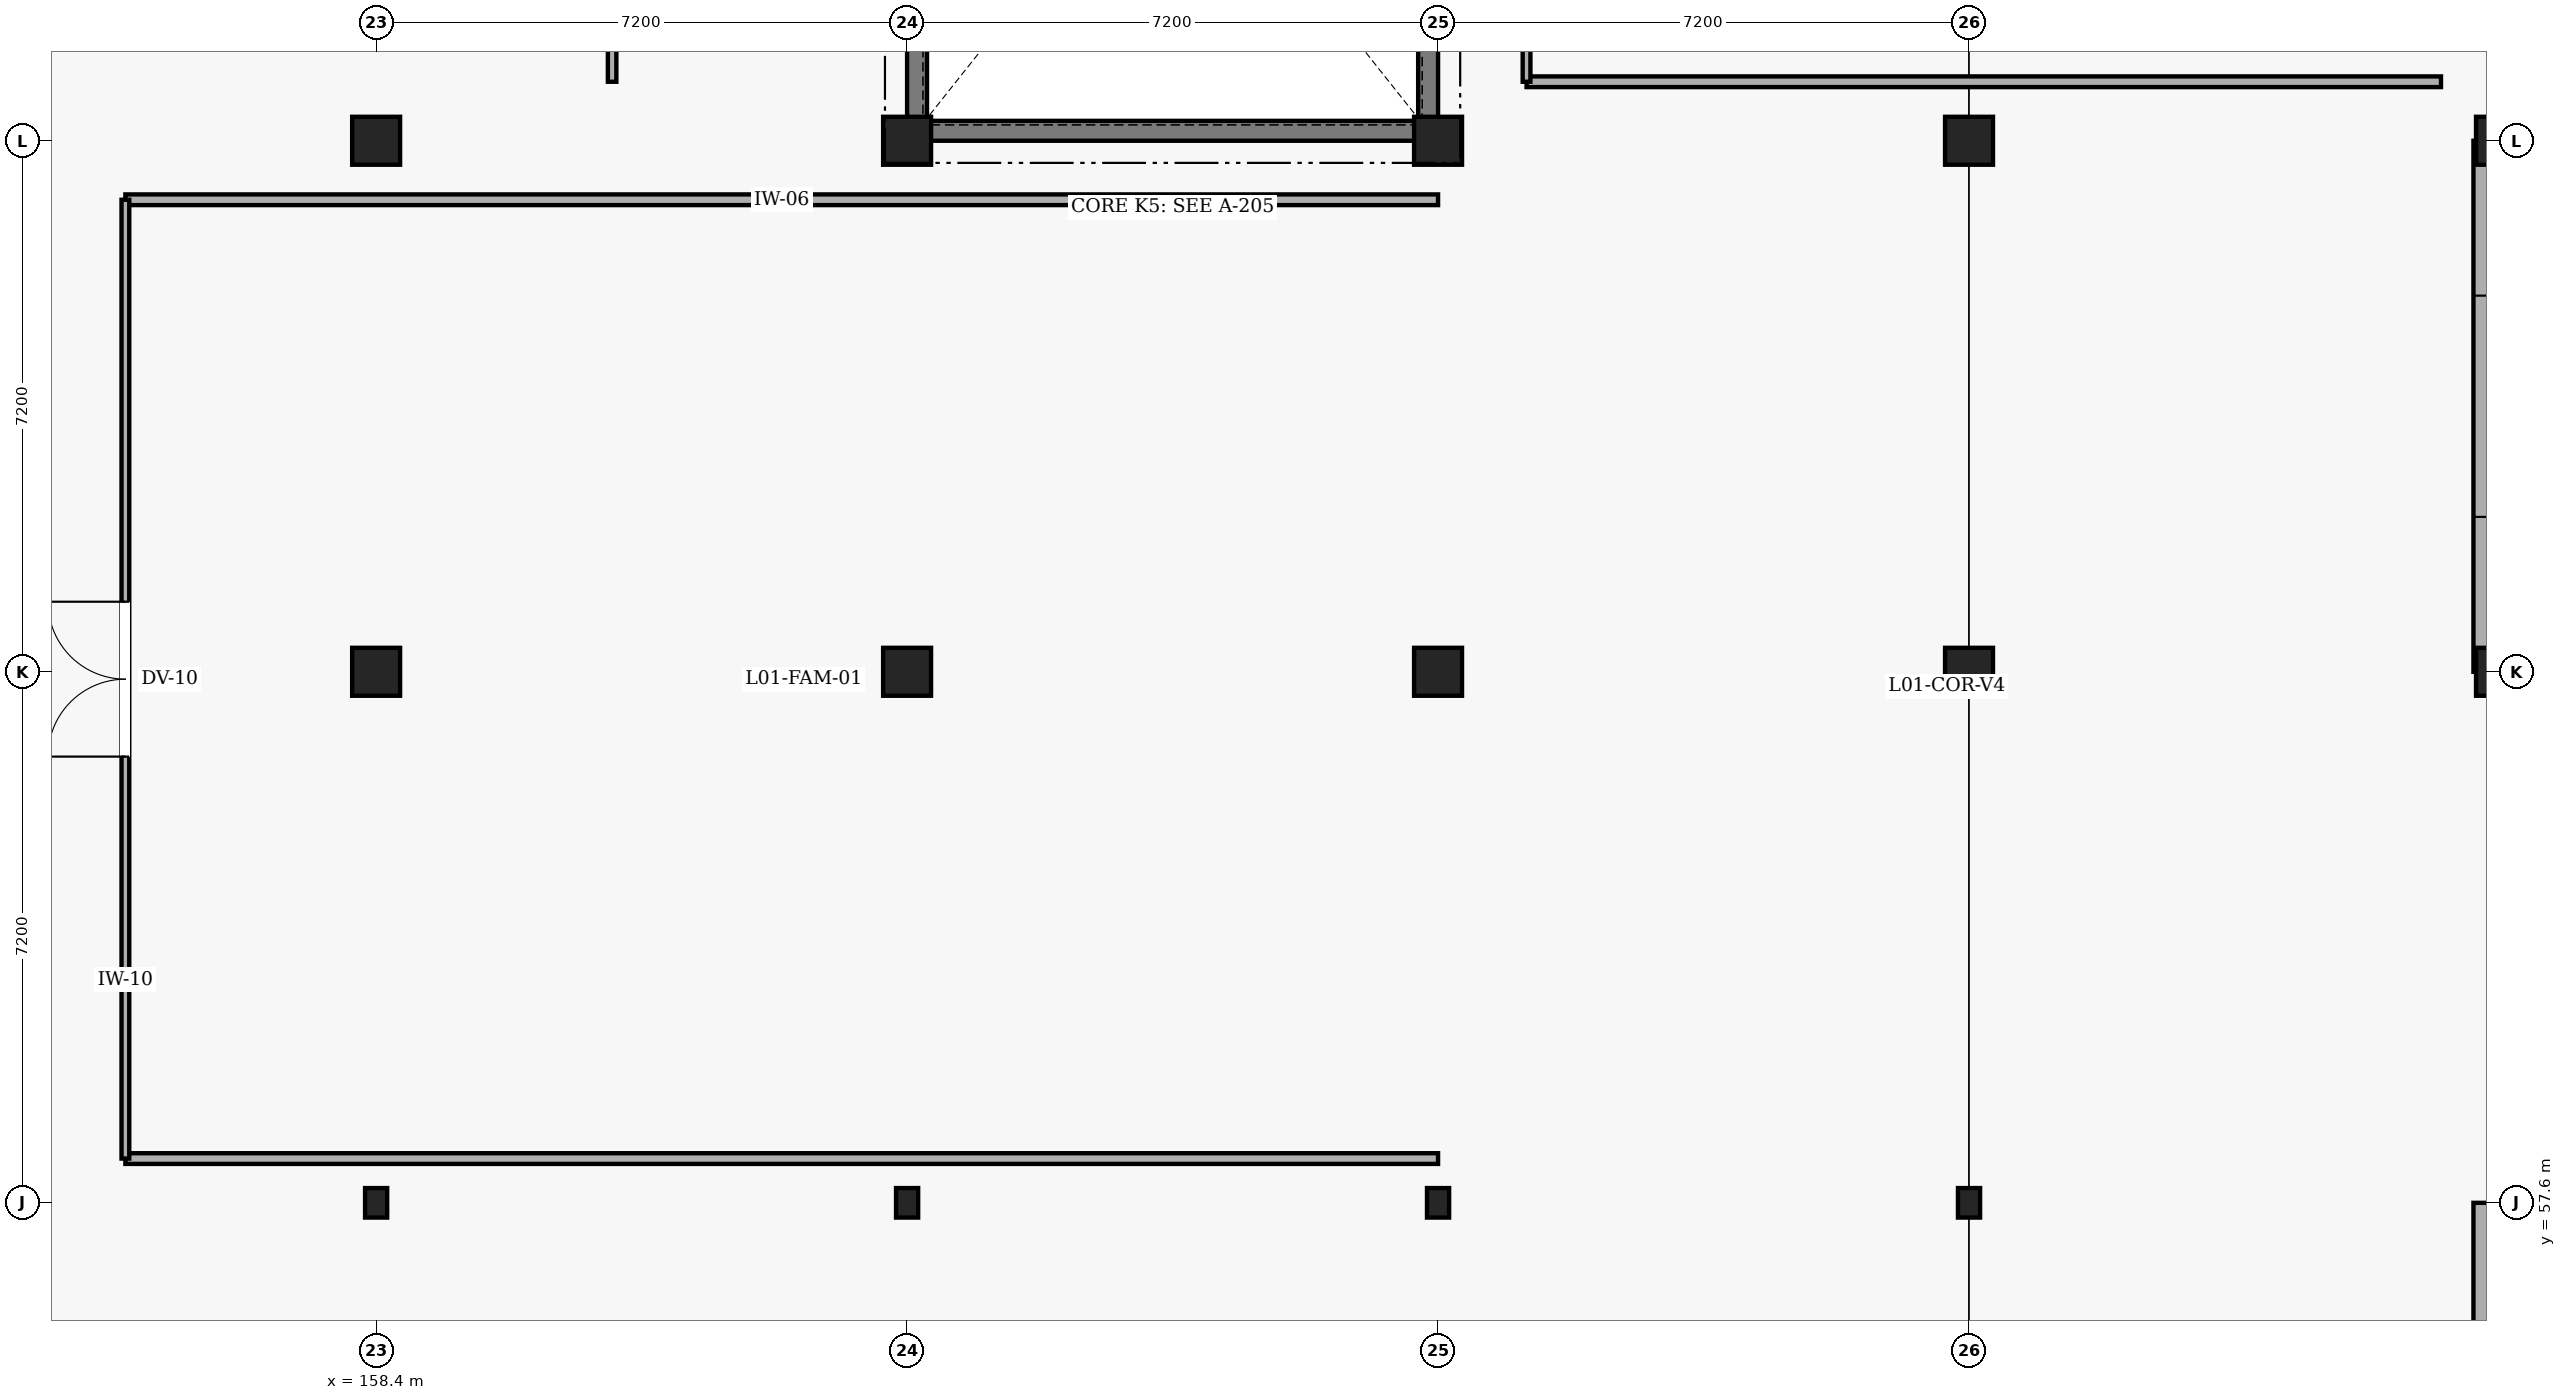
"""IFC4 building model, lengths in metres.
Left out: names, types, materials, properties, quantities, classifications, styles, units other than length and angle.
Written with IfcOpenShell. Run it as: python <this file> out.ifc"""

import sys

from ifc_helpers import new_model, si_unit, direction, frame, frame_2d, origin, origin_2d, place, context, subcontext, project, spatial, rectangle, i_section, extrude, element, fill, save


model = new_model("IFC4")
c1 = context("Model", 3, precision=1e-05, world=origin(), true_north=direction((0.0, 1.0)))
c2 = subcontext(c1, "Body", "Model", "MODEL_VIEW")
j1 = project(units=[si_unit("LENGTHUNIT", "METRE"), si_unit("PLANEANGLEUNIT", "RADIAN")], contexts=[c1])
p1 = place(None, origin())
s1 = spatial("IfcSite", under=j1, at=p1, CompositionType="ELEMENT")
p2 = place(p1, origin())
s2 = spatial("IfcBuilding", under=s1, at=p2, CompositionType="ELEMENT")
p3 = place(p2, frame((0.0, 0.0, 5.4)))
s3 = spatial("IfcBuildingStorey", under=s2, at=p3, CompositionType="ELEMENT", Elevation=5.4)
p4 = place(p3, frame((172.665, 86.13, 0.0), z_axis=(0.0, 0.0, 1.0), x_axis=(0.0, -1.0, 0.0)))
e1 = element("IfcWall", 1, at=p4, inside=s3, PredefinedType="SHEAR", context=c2, shape_type="SweptSolid", body=[
    extrude(rectangle(XDim=13.86, YDim=0.27, at=frame_2d((6.93, 0.0))), origin(), (0.0, 0.0, 1.0), 4.2),
])
p5 = place(p3, frame((172.8, 72.135, 0.0), z_axis=(0.0, 0.0, 1.0), x_axis=(-1.0, 0.0, 0.0)))
e2 = element("IfcWall", 2, at=p5, inside=s3, PredefinedType="SHEAR", context=c2, shape_type="SweptSolid", body=[
    extrude(rectangle(XDim=7.2, YDim=0.27, at=frame_2d((3.6, 0.0))), origin(), (0.0, 0.0, 1.0), 4.2),
])
p6 = place(p3, frame((165.735, 72.27, 0.0), z_axis=(0.0, 0.0, 1.0), x_axis=(0.0, 1.0, 0.0)))
e3 = element("IfcWall", 3, at=p6, inside=s3, PredefinedType="SHEAR", context=c2, shape_type="SweptSolid", body=[
    extrude(rectangle(XDim=13.86, YDim=0.27, at=frame_2d((6.93, 0.0))), origin(), (0.0, 0.0, 1.0), 4.2),
])
p7 = place(p6, frame((9.8, 0.0, 0.0)))
e4 = element("IfcOpeningElement", 4, at=p7, cuts=e3, PredefinedType="OPENING", context=c2, shape_type="SweptSolid", body=[
    extrude(rectangle(XDim=1.25, YDim=2.2, at=frame_2d((0.625, 1.1))), frame((0.0, 0.145, 0.0), z_axis=(0.0, -1.0, 0.0), x_axis=(1.0, 0.0, 0.0)), (0.0, 0.0, 1.0), 0.29),
])
p8 = place(p3, frame((158.4, 57.6, 0.0), z_axis=(0.0, 0.0, 1.0), x_axis=(1.0, 0.0, 0.0)))
e5 = element("IfcColumn", 5, at=p8, inside=s3, PredefinedType="COLUMN", context=c2, shape_type="SweptSolid", body=[
    extrude(i_section(OverallWidth=0.3, OverallDepth=0.4, WebThickness=0.013, FlangeThickness=0.024, FilletRadius=0.027, at=origin_2d()), origin(), (0.0, 0.0, 1.0), 3.9),
])
for number, where, z_axis, x_axis in (
    (6, (158.4, 64.8, 0.0), (0.0, 0.0, 1.0), (1.0, 0.0, 0.0)),
    (7, (158.4, 72.0, 0.0), (0.0, 0.0, 1.0), (1.0, 0.0, 0.0)),
):
    element("IfcColumn", number, at=place(p3, frame(where, z_axis=z_axis, x_axis=x_axis)), inside=s3, PredefinedType="COLUMN", context=c2, shape_type="SweptSolid", body=[
        extrude(rectangle(XDim=0.65, YDim=0.65, at=origin_2d()), origin(), (0.0, 0.0, 1.0), 3.9),
    ])
p9 = place(p3, frame((165.6, 57.6, 0.0), z_axis=(0.0, 0.0, 1.0), x_axis=(1.0, 0.0, 0.0)))
e8 = element("IfcColumn", 8, at=p9, inside=s3, PredefinedType="COLUMN", context=c2, shape_type="SweptSolid", body=[
    extrude(i_section(OverallWidth=0.3, OverallDepth=0.4, WebThickness=0.013, FlangeThickness=0.024, FilletRadius=0.027, at=origin_2d()), origin(), (0.0, 0.0, 1.0), 3.9),
])
for number, where, z_axis, x_axis in (
    (9, (165.6, 64.8, 0.0), (0.0, 0.0, 1.0), (1.0, 0.0, 0.0)),
    (10, (165.6, 72.0, 0.0), (0.0, 0.0, 1.0), (1.0, 0.0, 0.0)),
):
    element("IfcColumn", number, at=place(p3, frame(where, z_axis=z_axis, x_axis=x_axis)), inside=s3, PredefinedType="COLUMN", context=c2, shape_type="SweptSolid", body=[
        extrude(rectangle(XDim=0.65, YDim=0.65, at=origin_2d()), origin(), (0.0, 0.0, 1.0), 3.9),
    ])
p10 = place(p3, frame((172.8, 57.6, 0.0), z_axis=(0.0, 0.0, 1.0), x_axis=(1.0, 0.0, 0.0)))
e11 = element("IfcColumn", 11, at=p10, inside=s3, PredefinedType="COLUMN", context=c2, shape_type="SweptSolid", body=[
    extrude(i_section(OverallWidth=0.3, OverallDepth=0.4, WebThickness=0.013, FlangeThickness=0.024, FilletRadius=0.027, at=origin_2d()), origin(), (0.0, 0.0, 1.0), 3.9),
])
for number, where, z_axis, x_axis in (
    (12, (172.8, 64.8, 0.0), (0.0, 0.0, 1.0), (1.0, 0.0, 0.0)),
    (13, (172.8, 72.0, 0.0), (0.0, 0.0, 1.0), (1.0, 0.0, 0.0)),
):
    element("IfcColumn", number, at=place(p3, frame(where, z_axis=z_axis, x_axis=x_axis)), inside=s3, PredefinedType="COLUMN", context=c2, shape_type="SweptSolid", body=[
        extrude(rectangle(XDim=0.65, YDim=0.65, at=origin_2d()), origin(), (0.0, 0.0, 1.0), 3.9),
    ])
p11 = place(p3, frame((180.0, 57.6, 0.0), z_axis=(0.0, 0.0, 1.0), x_axis=(1.0, 0.0, 0.0)))
e14 = element("IfcColumn", 14, at=p11, inside=s3, PredefinedType="COLUMN", context=c2, shape_type="SweptSolid", body=[
    extrude(i_section(OverallWidth=0.3, OverallDepth=0.4, WebThickness=0.013, FlangeThickness=0.024, FilletRadius=0.027, at=origin_2d()), origin(), (0.0, 0.0, 1.0), 3.9),
])
for number, where, z_axis, x_axis in (
    (15, (180.0, 64.8, 0.0), (0.0, 0.0, 1.0), (1.0, 0.0, 0.0)),
    (16, (180.0, 72.0, 0.0), (0.0, 0.0, 1.0), (1.0, 0.0, 0.0)),
):
    element("IfcColumn", number, at=place(p3, frame(where, z_axis=z_axis, x_axis=x_axis)), inside=s3, PredefinedType="COLUMN", context=c2, shape_type="SweptSolid", body=[
        extrude(rectangle(XDim=0.65, YDim=0.65, at=origin_2d()), origin(), (0.0, 0.0, 1.0), 3.9),
    ])
for number, where, z_axis, x_axis in (
    (17, (187.2, 64.8, 0.0), (0.0, 0.0, 1.0), (1.0, 0.0, 0.0)),
    (18, (187.2, 72.0, 0.0), (0.0, 0.0, 1.0), (1.0, 0.0, 0.0)),
):
    element("IfcColumn", number, at=place(p3, frame(where, z_axis=z_axis, x_axis=x_axis)), inside=s3, PredefinedType="COLUMN", context=c2, shape_type="SweptSolid", body=[
        extrude(rectangle(XDim=0.65, YDim=0.65, at=origin_2d()), origin(), (0.0, 0.0, 1.0), 3.95),
    ])
p12 = place(p3, frame((187.02, 72.0, 0.0), z_axis=(0.0, 0.0, 1.0), x_axis=(0.0, -1.0, 0.0)))
e19 = element("IfcWall", 19, at=p12, inside=s3, PredefinedType="SOLIDWALL", context=c2, shape_type="SweptSolid", body=[
    extrude(rectangle(XDim=7.2, YDim=0.36, at=frame_2d((3.6, 0.0))), origin(), (0.0, 0.0, 1.0), 3.62),
])
p13 = place(p12, frame((2.1, 0.0, 0.9)))
e20 = element("IfcOpeningElement", 20, at=p13, cuts=e19, PredefinedType="OPENING", context=c2, shape_type="SweptSolid", body=[
    extrude(rectangle(XDim=3.0, YDim=1.75, at=frame_2d((1.5, 0.875))), frame((0.0, 0.19, 0.0), z_axis=(0.0, -1.0, 0.0), x_axis=(1.0, 0.0, 0.0)), (0.0, 0.0, 1.0), 0.38),
])
p14 = place(p3, frame((187.02, 57.6, 0.0), z_axis=(0.0, 0.0, 1.0), x_axis=(0.0, -1.0, 0.0)))
e21 = element("IfcWall", 21, at=p14, inside=s3, PredefinedType="SOLIDWALL", context=c2, shape_type="SweptSolid", body=[
    extrude(rectangle(XDim=7.23, YDim=0.36, at=frame_2d((3.615, 0.0))), origin(), (0.0, 0.0, 1.0), 3.25),
])
p15 = place(p14, frame((2.05, 0.0, 0.9)))
e22 = element("IfcOpeningElement", 22, at=p15, cuts=e21, PredefinedType="OPENING", context=c2, shape_type="SweptSolid", body=[
    extrude(rectangle(XDim=3.1, YDim=1.8, at=frame_2d((1.55, 0.9))), frame((0.0, 0.19, 0.0), z_axis=(0.0, -1.0, 0.0), x_axis=(1.0, 0.0, 0.0)), (0.0, 0.0, 1.0), 0.38),
])
for number, where, z_axis, x_axis in (
    (23, (155.0, 71.2, 0.0), (0.0, 0.0, 1.0), (1.0, 0.0, 0.0)),
    (24, (172.8, 58.2, 0.0), (0.0, 0.0, 1.0), (-1.0, 0.0, 0.0)),
):
    element("IfcWall", number, at=place(p3, frame(where, z_axis=z_axis, x_axis=x_axis)), inside=s3, PredefinedType="PARTITIONING", context=c2, shape_type="SweptSolid", body=[
        extrude(rectangle(XDim=17.8, YDim=0.145, at=frame_2d((8.9, 0.0))), origin(), (0.0, 0.0, 1.0), 3.5),
    ])
p16 = place(p3, frame((155.0, 58.2, 0.0), z_axis=(0.0, 0.0, 1.0), x_axis=(0.0, 1.0, 0.0)))
e25 = element("IfcWall", 25, at=p16, inside=s3, PredefinedType="PARTITIONING", context=c2, shape_type="SweptSolid", body=[
    extrude(rectangle(XDim=13.0, YDim=0.105, at=frame_2d((6.5, 0.0))), origin(), (0.0, 0.0, 1.0), 3.4),
])
p17 = place(p16, frame((5.45, 0.0, 0.0)))
e26 = element("IfcOpeningElement", 26, at=p17, cuts=e25, PredefinedType="OPENING", context=c2, shape_type="SweptSolid", body=[
    extrude(rectangle(XDim=2.1, YDim=2.3, at=frame_2d((1.05, 1.15))), frame((0.0, 0.062, 0.0), z_axis=(0.0, -1.0, 0.0), x_axis=(1.0, 0.0, 0.0)), (0.0, 0.0, 1.0), 0.125),
])
p18 = place(p3, frame((161.6, 84.8, 0.0), z_axis=(0.0, 0.0, 1.0), x_axis=(0.0, -1.0, 0.0)))
e27 = element("IfcWall", 27, at=p18, inside=s3, PredefinedType="PARTITIONING", context=c2, shape_type="SweptSolid", body=[
    extrude(rectangle(XDim=12.0, YDim=0.115, at=frame_2d((6.0, 0.0))), origin(), (0.0, 0.0, 1.0), 3.4),
])
p19 = place(p18, frame((4.95, 0.0, 0.0)))
e28 = element("IfcOpeningElement", 28, at=p19, cuts=e27, PredefinedType="OPENING", context=c2, shape_type="SweptSolid", body=[
    extrude(rectangle(XDim=2.1, YDim=2.3, at=frame_2d((1.05, 1.15))), frame((0.0, 0.067, 0.0), z_axis=(0.0, -1.0, 0.0), x_axis=(1.0, 0.0, 0.0)), (0.0, 0.0, 1.0), 0.135),
])
p20 = place(p3, frame((186.4, 72.8, 0.0), z_axis=(0.0, 0.0, 1.0), x_axis=(-1.0, 0.0, 0.0)))
e29 = element("IfcWall", 29, at=p20, inside=s3, PredefinedType="PARTITIONING", context=c2, shape_type="SweptSolid", body=[
    extrude(rectangle(XDim=12.4, YDim=0.145, at=frame_2d((6.2, 0.0))), origin(), (0.0, 0.0, 1.0), 3.6),
])
p21 = place(p3, frame((174.0, 72.8, 0.0), z_axis=(0.0, 0.0, 1.0), x_axis=(0.0, 1.0, 0.0)))
e30 = element("IfcWall", 30, at=p21, inside=s3, PredefinedType="PARTITIONING", context=c2, shape_type="SweptSolid", body=[
    extrude(rectangle(XDim=20.0, YDim=0.105, at=frame_2d((10.0, 0.0))), origin(), (0.0, 0.0, 1.0), 3.4),
])
p22 = place(p21, frame((9.41, 0.0, 0.0)))
e31 = element("IfcOpeningElement", 31, at=p22, cuts=e30, PredefinedType="OPENING", context=c2, shape_type="SweptSolid", body=[
    extrude(rectangle(XDim=1.18, YDim=2.18, at=frame_2d((0.59, 1.09))), frame((0.0, 0.062, 0.0), z_axis=(0.0, -1.0, 0.0), x_axis=(1.0, 0.0, 0.0)), (0.0, 0.0, 1.0), 0.125),
])
p23 = place(p13, origin())
e32 = element("IfcWindow", 32, at=p23, inside=s3, PartitioningType="SINGLE_PANEL", PredefinedType="WINDOW", context=c2, shape_type="SweptSolid", body=[
    extrude(rectangle(XDim=3.0, YDim=1.75, at=frame_2d((1.5, 0.875))), frame((0.0, 0.03, 0.0), z_axis=(0.0, -1.0, 0.0), x_axis=(1.0, 0.0, 0.0)), (0.0, 0.0, 1.0), 0.06),
])
fill(e20, e32)
p24 = place(p17, origin())
e33 = element("IfcDoor", 33, at=p24, inside=s3, OperationType="DOUBLE_DOOR_SINGLE_SWING", PredefinedType="DOOR", context=c2, shape_type="SweptSolid", body=[
    extrude(rectangle(XDim=2.1, YDim=2.3, at=frame_2d((1.05, 1.15))), frame((0.0, 0.025, 0.0), z_axis=(0.0, -1.0, 0.0), x_axis=(1.0, 0.0, 0.0)), (0.0, 0.0, 1.0), 0.05),
])
fill(e26, e33)
save(model, sys.argv[1])
